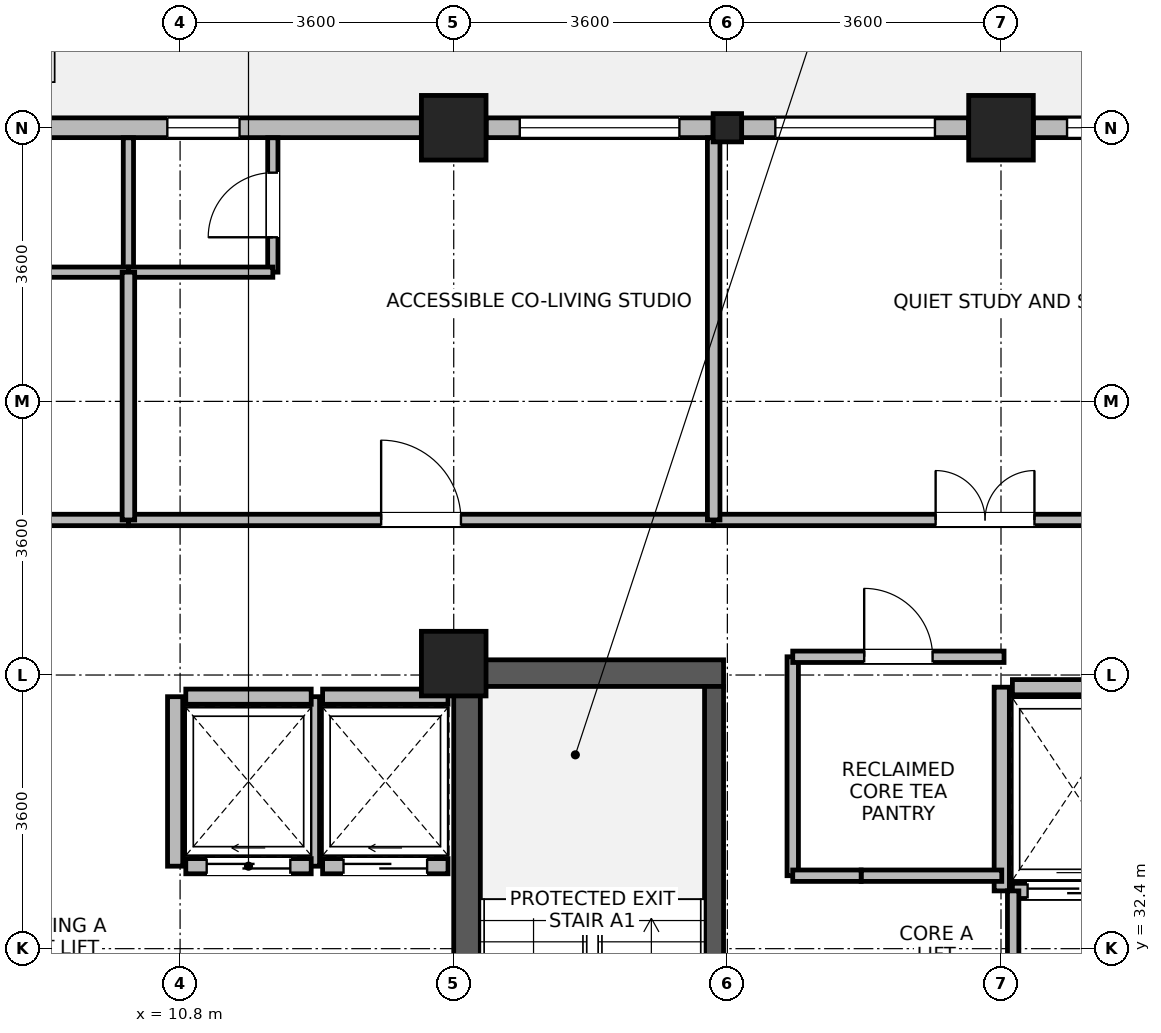
"""IFC4 building model, lengths in metres.
Left out: names, types, materials, properties, quantities, classifications, styles, units other than length and angle.
Written with IfcOpenShell. Run it as: python <this file> out.ifc"""

import sys

from ifc_helpers import new_model, si_unit, direction, frame, frame_2d, origin, origin_2d, place, context, subcontext, project, spatial, rectangle, i_section, extrude, source, transform, mapped, element, fill, save


model = new_model("IFC4")
c1 = context("Model", 3, precision=1e-05, world=origin(), true_north=direction((0.0, 1.0)))
c2 = subcontext(c1, "Body", "Model", "MODEL_VIEW")
j1 = project(units=[si_unit("LENGTHUNIT", "METRE"), si_unit("PLANEANGLEUNIT", "RADIAN")], contexts=[c1])
p1 = place(None, origin())
s1 = spatial("IfcSite", under=j1, at=p1, CompositionType="ELEMENT")
p2 = place(p1, origin())
s2 = spatial("IfcBuilding", under=s1, at=p2, CompositionType="ELEMENT")
p3 = place(p2, frame((0.0, 0.0, 268.4)))
s3 = spatial("IfcBuildingStorey", under=s2, at=p3, CompositionType="ELEMENT", Elevation=268.4)
p4 = place(p3, frame((14.575, 28.5, 0.0), z_axis=(0.0, 0.0, 1.0), x_axis=(0.0, 1.0, 0.0)))
e1 = element("IfcWall", 1, at=p4, inside=s3, PredefinedType="SHEAR", context=c2, shape_type="SweptSolid", body=[
    extrude(rectangle(XDim=7.7, YDim=0.35, at=frame_2d((3.85, 0.0))), origin(), (0.0, 0.0, 1.0), 3.475),
])
p5 = place(p3, frame((14.75, 36.025, 0.0), z_axis=(0.0, 0.0, 1.0), x_axis=(1.0, 0.0, 0.0)))
e2 = element("IfcWall", 2, at=p5, inside=s3, PredefinedType="SHEAR", context=c2, shape_type="SweptSolid", body=[
    extrude(rectangle(XDim=3.2, YDim=0.35, at=frame_2d((1.6, 0.0))), origin(), (0.0, 0.0, 1.0), 3.475),
])
p6 = place(p3, frame((17.825, 28.85, 0.0), z_axis=(0.0, 0.0, 1.0), x_axis=(0.0, 1.0, 0.0)))
e3 = element("IfcWall", 3, at=p6, inside=s3, PredefinedType="SHEAR", context=c2, shape_type="SweptSolid", body=[
    extrude(rectangle(XDim=7.0, YDim=0.25, at=frame_2d((3.5, 0.0))), origin(), (0.0, 0.0, 1.0), 3.475),
])
p7 = place(p6, frame((0.15, 0.0, 0.0)))
e4 = element("IfcOpeningElement", 4, at=p7, cuts=e3, PredefinedType="OPENING", context=c2, shape_type="SweptSolid", body=[
    extrude(rectangle(XDim=1.1, YDim=2.08, at=frame_2d((0.55, 1.04))), frame((0.0, 0.135, 0.0), z_axis=(0.0, -1.0, 0.0), x_axis=(1.0, 0.0, 0.0)), (0.0, 0.0, 1.0), 0.27),
])
m1 = source(origin(), c2, "Body", "SweptSolid", [
    extrude(rectangle(XDim=0.85, YDim=0.85, at=origin_2d()), origin(), (0.0, 0.0, 1.0), 3.7),
])
for number, where, z_axis, x_axis in (
    (5, (14.4, 36.15, 0.0), (0.0, 0.0, 1.0), (1.0, 0.0, 0.0)),
    (6, (14.4, 43.2, 0.0), (0.0, 0.0, 1.0), (1.0, 0.0, 0.0)),
    (7, (21.6, 43.2, 0.0), (0.0, 0.0, 1.0), (1.0, 0.0, 0.0)),
):
    element("IfcColumn", number, at=place(p3, frame(where, z_axis=z_axis, x_axis=x_axis)), inside=s3, PredefinedType="COLUMN", context=c2, shape_type="MappedRepresentation", body=[
        mapped(m1, transform((0.0, 0.0, 0.0), x_axis=(1.0, 0.0, 0.0), y_axis=(0.0, 1.0, 0.0), z_axis=(0.0, 0.0, 1.0), scale=1.0)),
    ])
m2 = source(origin(), c2, "Body", "SweptSolid", [
    extrude(i_section(OverallWidth=0.374, OverallDepth=0.372, WebThickness=0.015, FlangeThickness=0.026, FilletRadius=0.015, at=origin_2d()), origin(), (0.0, 0.0, 1.0), 3.7),
])
p8 = place(p3, frame((18.0, 43.2, 0.0), z_axis=(0.0, 0.0, 1.0), x_axis=(1.0, 0.0, 0.0)))
e8 = element("IfcColumn", 8, at=p8, inside=s3, PredefinedType="COLUMN", context=c2, shape_type="MappedRepresentation", body=[
    mapped(m2, transform((0.0, 0.0, 0.0), x_axis=(1.0, 0.0, 0.0), y_axis=(0.0, 1.0, 0.0), z_axis=(0.0, 0.0, 1.0), scale=1.0)),
])
p9 = place(p3, frame((22.026, 43.2, 0.0), z_axis=(0.0, 0.0, 1.0), x_axis=(1.0, 0.0, 0.0)))
e9 = element("IfcWall", 9, at=p9, inside=s3, PredefinedType="STANDARD", context=c2, shape_type="SweptSolid", body=[
    extrude(rectangle(XDim=2.986, YDim=0.26, at=frame_2d((1.493, 0.0))), origin(), (0.0, 0.0, 1.0), 3.055),
])
p10 = place(p9, frame((0.443, 0.0, 0.85)))
e10 = element("IfcOpeningElement", 10, at=p10, cuts=e9, PredefinedType="OPENING", context=c2, shape_type="SweptSolid", body=[
    extrude(rectangle(XDim=2.1, YDim=1.95, at=frame_2d((1.05, 0.975))), frame((0.0, 0.14, 0.0), z_axis=(0.0, -1.0, 0.0), x_axis=(1.0, 0.0, 0.0)), (0.0, 0.0, 1.0), 0.28),
])
p11 = place(p3, frame((18.188, 43.2, 0.0), z_axis=(0.0, 0.0, 1.0), x_axis=(1.0, 0.0, 0.0)))
e11 = element("IfcWall", 11, at=p11, inside=s3, PredefinedType="STANDARD", context=c2, shape_type="SweptSolid", body=[
    extrude(rectangle(XDim=2.986, YDim=0.26, at=frame_2d((1.493, 0.0))), origin(), (0.0, 0.0, 1.0), 3.055),
])
p12 = place(p11, frame((0.443, 0.0, 0.85)))
e12 = element("IfcOpeningElement", 12, at=p12, cuts=e11, PredefinedType="OPENING", context=c2, shape_type="SweptSolid", body=[
    extrude(rectangle(XDim=2.1, YDim=1.95, at=frame_2d((1.05, 0.975))), frame((0.0, 0.14, 0.0), z_axis=(0.0, -1.0, 0.0), x_axis=(1.0, 0.0, 0.0)), (0.0, 0.0, 1.0), 0.28),
])
p13 = place(p3, frame((14.826, 43.2, 0.0), z_axis=(0.0, 0.0, 1.0), x_axis=(1.0, 0.0, 0.0)))
e13 = element("IfcWall", 13, at=p13, inside=s3, PredefinedType="STANDARD", context=c2, shape_type="SweptSolid", body=[
    extrude(rectangle(XDim=2.986, YDim=0.26, at=frame_2d((1.493, 0.0))), origin(), (0.0, 0.0, 1.0), 3.055),
])
p14 = place(p13, frame((0.443, 0.0, 0.85)))
e14 = element("IfcOpeningElement", 14, at=p14, cuts=e13, PredefinedType="OPENING", context=c2, shape_type="SweptSolid", body=[
    extrude(rectangle(XDim=2.1, YDim=1.95, at=frame_2d((1.05, 0.975))), frame((0.0, 0.14, 0.0), z_axis=(0.0, -1.0, 0.0), x_axis=(1.0, 0.0, 0.0)), (0.0, 0.0, 1.0), 0.28),
])
p15 = place(p3, frame((3.735, 43.2, 0.0), z_axis=(0.0, 0.0, 1.0), x_axis=(1.0, 0.0, 0.0)))
e15 = element("IfcWall", 15, at=p15, inside=s3, PredefinedType="STANDARD", context=c2, shape_type="SweptSolid", body=[
    extrude(rectangle(XDim=10.239, YDim=0.26, at=frame_2d((5.12, 0.0))), origin(), (0.0, 0.0, 1.0), 3.455),
])
p16 = place(p15, frame((0.656, 0.0, 0.85)))
e16 = element("IfcOpeningElement", 16, at=p16, cuts=e15, PredefinedType="OPENING", context=c2, shape_type="SweptSolid", body=[
    extrude(rectangle(XDim=2.1, YDim=1.95, at=frame_2d((1.05, 0.975))), frame((0.0, 0.14, 0.0), z_axis=(0.0, -1.0, 0.0), x_axis=(1.0, 0.0, 0.0)), (0.0, 0.0, 1.0), 0.28),
])
p17 = place(p15, frame((6.897, 0.0, 0.85)))
e17 = element("IfcOpeningElement", 17, at=p17, cuts=e15, PredefinedType="OPENING", context=c2, shape_type="SweptSolid", body=[
    extrude(rectangle(XDim=0.95, YDim=1.75, at=frame_2d((0.475, 0.875))), frame((0.0, 0.14, 0.0), z_axis=(0.0, -1.0, 0.0), x_axis=(1.0, 0.0, 0.0)), (0.0, 0.0, 1.0), 0.28),
])
p18 = place(p3, frame((12.675, 33.485, 0.0), z_axis=(0.0, 0.0, 1.0), x_axis=(1.0, 0.0, 0.0)))
e18 = element("IfcWall", 18, at=p18, inside=s3, PredefinedType="PARTITIONING", context=c2, shape_type="SweptSolid", body=[
    extrude(rectangle(XDim=1.65, YDim=0.2, at=frame_2d((0.825, 0.0))), origin(), (0.0, 0.0, 1.0), 3.455),
])
p19 = place(p18, frame((0.275, 0.0, 0.0)))
e19 = element("IfcOpeningElement", 19, at=p19, cuts=e18, PredefinedType="OPENING", context=c2, shape_type="SweptSolid", body=[
    extrude(rectangle(XDim=1.1, YDim=2.12, at=frame_2d((0.55, 1.06))), frame((0.0, 0.11, 0.0), z_axis=(0.0, -1.0, 0.0), x_axis=(1.0, 0.0, 0.0)), (0.0, 0.0, 1.0), 0.22),
])
p20 = place(p3, frame((12.675, 35.715, 0.0), z_axis=(0.0, 0.0, 1.0), x_axis=(1.0, 0.0, 0.0)))
e20 = element("IfcWall", 20, at=p20, inside=s3, PredefinedType="PARTITIONING", context=c2, shape_type="SweptSolid", body=[
    extrude(rectangle(XDim=1.65, YDim=0.2, at=frame_2d((0.825, 0.0))), origin(), (0.0, 0.0, 1.0), 3.455),
])
p21 = place(p3, frame((12.535, 33.485, 0.0), z_axis=(0.0, 0.0, 1.0), x_axis=(0.0, 1.0, 0.0)))
e21 = element("IfcWall", 21, at=p21, inside=s3, PredefinedType="PARTITIONING", context=c2, shape_type="SweptSolid", body=[
    extrude(rectangle(XDim=2.23, YDim=0.2, at=frame_2d((1.115, 0.0))), origin(), (0.0, 0.0, 1.0), 3.455),
])
p22 = place(p3, frame((10.875, 33.485, 0.0), z_axis=(0.0, 0.0, 1.0), x_axis=(1.0, 0.0, 0.0)))
e22 = element("IfcWall", 22, at=p22, inside=s3, PredefinedType="PARTITIONING", context=c2, shape_type="SweptSolid", body=[
    extrude(rectangle(XDim=1.65, YDim=0.2, at=frame_2d((0.825, 0.0))), origin(), (0.0, 0.0, 1.0), 3.455),
])
p23 = place(p22, frame((0.275, 0.0, 0.0)))
e23 = element("IfcOpeningElement", 23, at=p23, cuts=e22, PredefinedType="OPENING", context=c2, shape_type="SweptSolid", body=[
    extrude(rectangle(XDim=1.1, YDim=2.12, at=frame_2d((0.55, 1.06))), frame((0.0, 0.11, 0.0), z_axis=(0.0, -1.0, 0.0), x_axis=(1.0, 0.0, 0.0)), (0.0, 0.0, 1.0), 0.22),
])
p24 = place(p3, frame((10.875, 35.715, 0.0), z_axis=(0.0, 0.0, 1.0), x_axis=(1.0, 0.0, 0.0)))
e24 = element("IfcWall", 24, at=p24, inside=s3, PredefinedType="PARTITIONING", context=c2, shape_type="SweptSolid", body=[
    extrude(rectangle(XDim=1.65, YDim=0.2, at=frame_2d((0.825, 0.0))), origin(), (0.0, 0.0, 1.0), 3.455),
])
p25 = place(p3, frame((10.735, 33.485, 0.0), z_axis=(0.0, 0.0, 1.0), x_axis=(0.0, 1.0, 0.0)))
e25 = element("IfcWall", 25, at=p25, inside=s3, PredefinedType="PARTITIONING", context=c2, shape_type="SweptSolid", body=[
    extrude(rectangle(XDim=2.23, YDim=0.2, at=frame_2d((1.115, 0.0))), origin(), (0.0, 0.0, 1.0), 3.455),
])
p26 = place(p3, frame((21.75, 33.16, 0.0), z_axis=(0.0, 0.0, 1.0), x_axis=(1.0, 0.0, 0.0)))
e26 = element("IfcWall", 26, at=p26, inside=s3, PredefinedType="PARTITIONING", context=c2, shape_type="SweptSolid", body=[
    extrude(rectangle(XDim=1.6, YDim=0.2, at=frame_2d((0.8, 0.0))), origin(), (0.0, 0.0, 1.0), 3.455),
])
p27 = place(p26, frame((0.2, 0.0, 0.0)))
e27 = element("IfcOpeningElement", 27, at=p27, cuts=e26, PredefinedType="OPENING", context=c2, shape_type="SweptSolid", body=[
    extrude(rectangle(XDim=1.2, YDim=2.12, at=frame_2d((0.6, 1.06))), frame((0.0, 0.11, 0.0), z_axis=(0.0, -1.0, 0.0), x_axis=(1.0, 0.0, 0.0)), (0.0, 0.0, 1.0), 0.22),
])
p28 = place(p3, frame((21.75, 35.84, 0.0), z_axis=(0.0, 0.0, 1.0), x_axis=(1.0, 0.0, 0.0)))
e28 = element("IfcWall", 28, at=p28, inside=s3, PredefinedType="PARTITIONING", context=c2, shape_type="SweptSolid", body=[
    extrude(rectangle(XDim=1.6, YDim=0.2, at=frame_2d((0.8, 0.0))), origin(), (0.0, 0.0, 1.0), 2.555),
])
p29 = place(p3, frame((21.61, 33.16, 0.0), z_axis=(0.0, 0.0, 1.0), x_axis=(0.0, 1.0, 0.0)))
e29 = element("IfcWall", 29, at=p29, inside=s3, PredefinedType="PARTITIONING", context=c2, shape_type="SweptSolid", body=[
    extrude(rectangle(XDim=2.68, YDim=0.2, at=frame_2d((1.34, 0.0))), origin(), (0.0, 0.0, 1.0), 3.455),
])
p30 = place(p3, frame((10.12, 41.3, 0.0), z_axis=(0.0, 0.0, 1.0), x_axis=(0.0, 1.0, 0.0)))
e30 = element("IfcWall", 30, at=p30, inside=s3, PredefinedType="PARTITIONING", context=c2, shape_type="SweptSolid", body=[
    extrude(rectangle(XDim=1.768, YDim=0.135, at=frame_2d((0.884, 0.0))), origin(), (0.0, 0.0, 1.0), 3.455),
])
p31 = place(p3, frame((12.02, 41.3, 0.0), z_axis=(0.0, 0.0, 1.0), x_axis=(0.0, 1.0, 0.0)))
e31 = element("IfcWall", 31, at=p31, inside=s3, PredefinedType="PARTITIONING", context=c2, shape_type="SweptSolid", body=[
    extrude(rectangle(XDim=1.768, YDim=0.135, at=frame_2d((0.884, 0.0))), origin(), (0.0, 0.0, 1.0), 3.455),
])
p32 = place(p31, frame((0.459, 0.0, 0.0)))
e32 = element("IfcOpeningElement", 32, at=p32, cuts=e31, PredefinedType="OPENING", context=c2, shape_type="SweptSolid", body=[
    extrude(rectangle(XDim=0.85, YDim=2.04, at=frame_2d((0.425, 1.02))), frame((0.0, 0.078, 0.0), z_axis=(0.0, -1.0, 0.0), x_axis=(1.0, 0.0, 0.0)), (0.0, 0.0, 1.0), 0.155),
])
p33 = place(p3, frame((10.12, 41.3, 0.0), z_axis=(0.0, 0.0, 1.0), x_axis=(1.0, 0.0, 0.0)))
e33 = element("IfcWall", 33, at=p33, inside=s3, PredefinedType="PARTITIONING", context=c2, shape_type="SweptSolid", body=[
    extrude(rectangle(XDim=1.9, YDim=0.135, at=frame_2d((0.95, 0.0))), origin(), (0.0, 0.0, 1.0), 3.455),
])
p34 = place(p3, frame((8.22, 41.3, 0.0), z_axis=(0.0, 0.0, 1.0), x_axis=(1.0, 0.0, 0.0)))
e34 = element("IfcWall", 34, at=p34, inside=s3, PredefinedType="PARTITIONING", context=c2, shape_type="SweptSolid", body=[
    extrude(rectangle(XDim=1.9, YDim=0.135, at=frame_2d((0.95, 0.0))), origin(), (0.0, 0.0, 1.0), 3.455),
])
p35 = place(p3, frame((10.12, 38.04, 0.0), z_axis=(0.0, 0.0, 1.0), x_axis=(1.0, 0.0, 0.0)))
e35 = element("IfcWall", 35, at=p35, inside=s3, PredefinedType="PARTITIONING", context=c2, shape_type="SweptSolid", body=[
    extrude(rectangle(XDim=7.7, YDim=0.15, at=frame_2d((3.85, 0.0))), origin(), (0.0, 0.0, 1.0), 3.455),
])
p36 = place(p35, frame((3.325, 0.0, 0.0)))
e36 = element("IfcOpeningElement", 36, at=p36, cuts=e35, PredefinedType="OPENING", context=c2, shape_type="SweptSolid", body=[
    extrude(rectangle(XDim=1.05, YDim=2.12, at=frame_2d((0.525, 1.06))), frame((0.0, 0.085, 0.0), z_axis=(0.0, -1.0, 0.0), x_axis=(1.0, 0.0, 0.0)), (0.0, 0.0, 1.0), 0.17),
])
p37 = place(p3, frame((17.82, 38.04, 0.0), z_axis=(0.0, 0.0, 1.0), x_axis=(1.0, 0.0, 0.0)))
e37 = element("IfcWall", 37, at=p37, inside=s3, PredefinedType="PARTITIONING", context=c2, shape_type="SweptSolid", body=[
    extrude(rectangle(XDim=7.14, YDim=0.15, at=frame_2d((3.57, 0.0))), origin(), (0.0, 0.0, 1.0), 3.455),
])
p38 = place(p37, frame((2.92, 0.0, 0.0)))
e38 = element("IfcOpeningElement", 38, at=p38, cuts=e37, PredefinedType="OPENING", context=c2, shape_type="SweptSolid", body=[
    extrude(rectangle(XDim=1.3, YDim=2.12, at=frame_2d((0.65, 1.06))), frame((0.0, 0.085, 0.0), z_axis=(0.0, -1.0, 0.0), x_axis=(1.0, 0.0, 0.0)), (0.0, 0.0, 1.0), 0.17),
])
p39 = place(p3, frame((3.732, 38.04, 0.0), z_axis=(0.0, 0.0, 1.0), x_axis=(1.0, 0.0, 0.0)))
e39 = element("IfcWall", 39, at=p39, inside=s3, PredefinedType="PARTITIONING", context=c2, shape_type="SweptSolid", body=[
    extrude(rectangle(XDim=6.388, YDim=0.15, at=frame_2d((3.194, 0.0))), origin(), (0.0, 0.0, 1.0), 3.455),
])
p40 = place(p39, frame((2.719, 0.0, 0.0)))
e40 = element("IfcOpeningElement", 40, at=p40, cuts=e39, PredefinedType="OPENING", context=c2, shape_type="SweptSolid", body=[
    extrude(rectangle(XDim=0.95, YDim=2.1, at=frame_2d((0.475, 1.05))), frame((0.0, 0.085, 0.0), z_axis=(0.0, -1.0, 0.0), x_axis=(1.0, 0.0, 0.0)), (0.0, 0.0, 1.0), 0.17),
])
p41 = place(p3, frame((18.86, 33.36, 0.0), z_axis=(0.0, 0.0, 1.0), x_axis=(0.0, 1.0, 0.0)))
e41 = element("IfcWall", 41, at=p41, inside=s3, PredefinedType="PARTITIONING", context=c2, shape_type="SweptSolid", body=[
    extrude(rectangle(XDim=2.88, YDim=0.15, at=frame_2d((1.44, 0.0))), origin(), (0.0, 0.0, 1.0), 3.455),
])
p42 = place(p3, frame((18.86, 36.24, 0.0), z_axis=(0.0, 0.0, 1.0), x_axis=(1.0, 0.0, 0.0)))
e42 = element("IfcWall", 42, at=p42, inside=s3, PredefinedType="PARTITIONING", context=c2, shape_type="SweptSolid", body=[
    extrude(rectangle(XDim=2.78, YDim=0.15, at=frame_2d((1.39, 0.0))), origin(), (0.0, 0.0, 1.0), 2.555),
])
p43 = place(p42, frame((0.94, 0.0, 0.0)))
e43 = element("IfcOpeningElement", 43, at=p43, cuts=e42, PredefinedType="OPENING", context=c2, shape_type="SweptSolid", body=[
    extrude(rectangle(XDim=0.9, YDim=2.08, at=frame_2d((0.45, 1.04))), frame((0.0, 0.085, 0.0), z_axis=(0.0, -1.0, 0.0), x_axis=(1.0, 0.0, 0.0)), (0.0, 0.0, 1.0), 0.17),
])
p44 = place(p3, frame((19.76, 33.36, 0.0), z_axis=(0.0, 0.0, 1.0), x_axis=(1.0, 0.0, 0.0)))
e44 = element("IfcWall", 44, at=p44, inside=s3, PredefinedType="PARTITIONING", context=c2, shape_type="SweptSolid", body=[
    extrude(rectangle(XDim=1.85, YDim=0.15, at=frame_2d((0.925, 0.0))), origin(), (0.0, 0.0, 1.0), 3.455),
])
p45 = place(p3, frame((18.86, 33.36, 0.0), z_axis=(0.0, 0.0, 1.0), x_axis=(1.0, 0.0, 0.0)))
e45 = element("IfcWall", 45, at=p45, inside=s3, PredefinedType="PARTITIONING", context=c2, shape_type="SweptSolid", body=[
    extrude(rectangle(XDim=0.9, YDim=0.15, at=frame_2d((0.45, 0.0))), origin(), (0.0, 0.0, 1.0), 3.455),
])
p46 = place(p3, frame((17.82, 38.04, 0.0), z_axis=(0.0, 0.0, 1.0), x_axis=(0.0, 1.0, 0.0)))
e46 = element("IfcWall", 46, at=p46, inside=s3, PredefinedType="PARTITIONING", context=c2, shape_type="SweptSolid", body=[
    extrude(rectangle(XDim=5.028, YDim=0.165, at=frame_2d((2.514, 0.0))), origin(), (0.0, 0.0, 1.0), 3.215),
])
p47 = place(p3, frame((10.12, 38.04, 0.0), z_axis=(0.0, 0.0, 1.0), x_axis=(0.0, 1.0, 0.0)))
e47 = element("IfcWall", 47, at=p47, inside=s3, PredefinedType="PARTITIONING", context=c2, shape_type="SweptSolid", body=[
    extrude(rectangle(XDim=3.26, YDim=0.165, at=frame_2d((1.63, 0.0))), origin(), (0.0, 0.0, 1.0), 3.455),
])
p48 = place(p3, frame((21.76, 31.24, 0.0), z_axis=(0.0, 0.0, 1.0), x_axis=(0.0, 1.0, 0.0)))
e48 = element("IfcWall", 48, at=p48, inside=s3, PredefinedType="PARTITIONING", context=c2, shape_type="SweptSolid", body=[
    extrude(rectangle(XDim=1.92, YDim=0.15, at=frame_2d((0.96, 0.0))), origin(), (0.0, 0.0, 1.0), 3.455),
])
p49 = place(p10, origin())
e49 = element("IfcWindow", 49, at=p49, inside=s3, PartitioningType="SINGLE_PANEL", PredefinedType="WINDOW", context=c2, shape_type="SweptSolid", body=[
    extrude(rectangle(XDim=2.1, YDim=1.95, at=frame_2d((1.05, 0.975))), frame((0.0, 0.03, 0.0), z_axis=(0.0, -1.0, 0.0), x_axis=(1.0, 0.0, 0.0)), (0.0, 0.0, 1.0), 0.06),
])
fill(e10, e49)
p50 = place(p12, origin())
e50 = element("IfcWindow", 50, at=p50, inside=s3, PartitioningType="SINGLE_PANEL", PredefinedType="WINDOW", context=c2, shape_type="SweptSolid", body=[
    extrude(rectangle(XDim=2.1, YDim=1.95, at=frame_2d((1.05, 0.975))), frame((0.0, 0.03, 0.0), z_axis=(0.0, -1.0, 0.0), x_axis=(1.0, 0.0, 0.0)), (0.0, 0.0, 1.0), 0.06),
])
fill(e12, e50)
p51 = place(p14, origin())
e51 = element("IfcWindow", 51, at=p51, inside=s3, PartitioningType="SINGLE_PANEL", PredefinedType="WINDOW", context=c2, shape_type="SweptSolid", body=[
    extrude(rectangle(XDim=2.1, YDim=1.95, at=frame_2d((1.05, 0.975))), frame((0.0, 0.03, 0.0), z_axis=(0.0, -1.0, 0.0), x_axis=(1.0, 0.0, 0.0)), (0.0, 0.0, 1.0), 0.06),
])
fill(e14, e51)
p52 = place(p17, origin())
e52 = element("IfcWindow", 52, at=p52, inside=s3, PartitioningType="SINGLE_PANEL", PredefinedType="WINDOW", context=c2, shape_type="SweptSolid", body=[
    extrude(rectangle(XDim=0.95, YDim=1.75, at=frame_2d((0.475, 0.875))), frame((0.0, 0.03, 0.0), z_axis=(0.0, -1.0, 0.0), x_axis=(1.0, 0.0, 0.0)), (0.0, 0.0, 1.0), 0.06),
])
fill(e17, e52)
p53 = place(p19, origin())
e53 = element("IfcDoor", 53, at=p53, inside=s3, OperationType="SLIDING_TO_LEFT", PredefinedType="DOOR", context=c2, shape_type="SweptSolid", body=[
    extrude(rectangle(XDim=1.1, YDim=2.12, at=frame_2d((0.55, 1.06))), frame((0.0, 0.025, 0.0), z_axis=(0.0, -1.0, 0.0), x_axis=(1.0, 0.0, 0.0)), (0.0, 0.0, 1.0), 0.05),
])
fill(e19, e53)
p54 = place(p23, origin())
e54 = element("IfcDoor", 54, at=p54, inside=s3, OperationType="SLIDING_TO_LEFT", PredefinedType="DOOR", context=c2, shape_type="SweptSolid", body=[
    extrude(rectangle(XDim=1.1, YDim=2.12, at=frame_2d((0.55, 1.06))), frame((0.0, 0.025, 0.0), z_axis=(0.0, -1.0, 0.0), x_axis=(1.0, 0.0, 0.0)), (0.0, 0.0, 1.0), 0.05),
])
fill(e23, e54)
p55 = place(p27, origin())
e55 = element("IfcDoor", 55, at=p55, inside=s3, OperationType="SLIDING_TO_RIGHT", PredefinedType="DOOR", context=c2, shape_type="SweptSolid", body=[
    extrude(rectangle(XDim=1.2, YDim=2.12, at=frame_2d((0.6, 1.06))), frame((0.0, 0.025, 0.0), z_axis=(0.0, -1.0, 0.0), x_axis=(1.0, 0.0, 0.0)), (0.0, 0.0, 1.0), 0.05),
])
fill(e27, e55)
p56 = place(p32, origin())
e56 = element("IfcDoor", 56, at=p56, inside=s3, OperationType="SINGLE_SWING_LEFT", PredefinedType="DOOR", context=c2, shape_type="SweptSolid", body=[
    extrude(rectangle(XDim=0.85, YDim=2.04, at=frame_2d((0.425, 1.02))), frame((0.0, 0.025, 0.0), z_axis=(0.0, -1.0, 0.0), x_axis=(1.0, 0.0, 0.0)), (0.0, 0.0, 1.0), 0.05),
])
fill(e32, e56)
p57 = place(p36, origin())
e57 = element("IfcDoor", 57, at=p57, inside=s3, OperationType="SINGLE_SWING_LEFT", PredefinedType="DOOR", context=c2, shape_type="SweptSolid", body=[
    extrude(rectangle(XDim=1.05, YDim=2.12, at=frame_2d((0.525, 1.06))), frame((0.0, 0.025, 0.0), z_axis=(0.0, -1.0, 0.0), x_axis=(1.0, 0.0, 0.0)), (0.0, 0.0, 1.0), 0.05),
])
fill(e36, e57)
p58 = place(p38, origin())
e58 = element("IfcDoor", 58, at=p58, inside=s3, OperationType="DOUBLE_DOOR_SINGLE_SWING", PredefinedType="DOOR", context=c2, shape_type="SweptSolid", body=[
    extrude(rectangle(XDim=1.3, YDim=2.12, at=frame_2d((0.65, 1.06))), frame((0.0, 0.025, 0.0), z_axis=(0.0, -1.0, 0.0), x_axis=(1.0, 0.0, 0.0)), (0.0, 0.0, 1.0), 0.05),
])
fill(e38, e58)
p59 = place(p43, origin())
e59 = element("IfcDoor", 59, at=p59, inside=s3, OperationType="SINGLE_SWING_LEFT", PredefinedType="DOOR", context=c2, shape_type="SweptSolid", body=[
    extrude(rectangle(XDim=0.9, YDim=2.08, at=frame_2d((0.45, 1.04))), frame((0.0, 0.025, 0.0), z_axis=(0.0, -1.0, 0.0), x_axis=(1.0, 0.0, 0.0)), (0.0, 0.0, 1.0), 0.05),
])
fill(e43, e59)
save(model, sys.argv[1])
